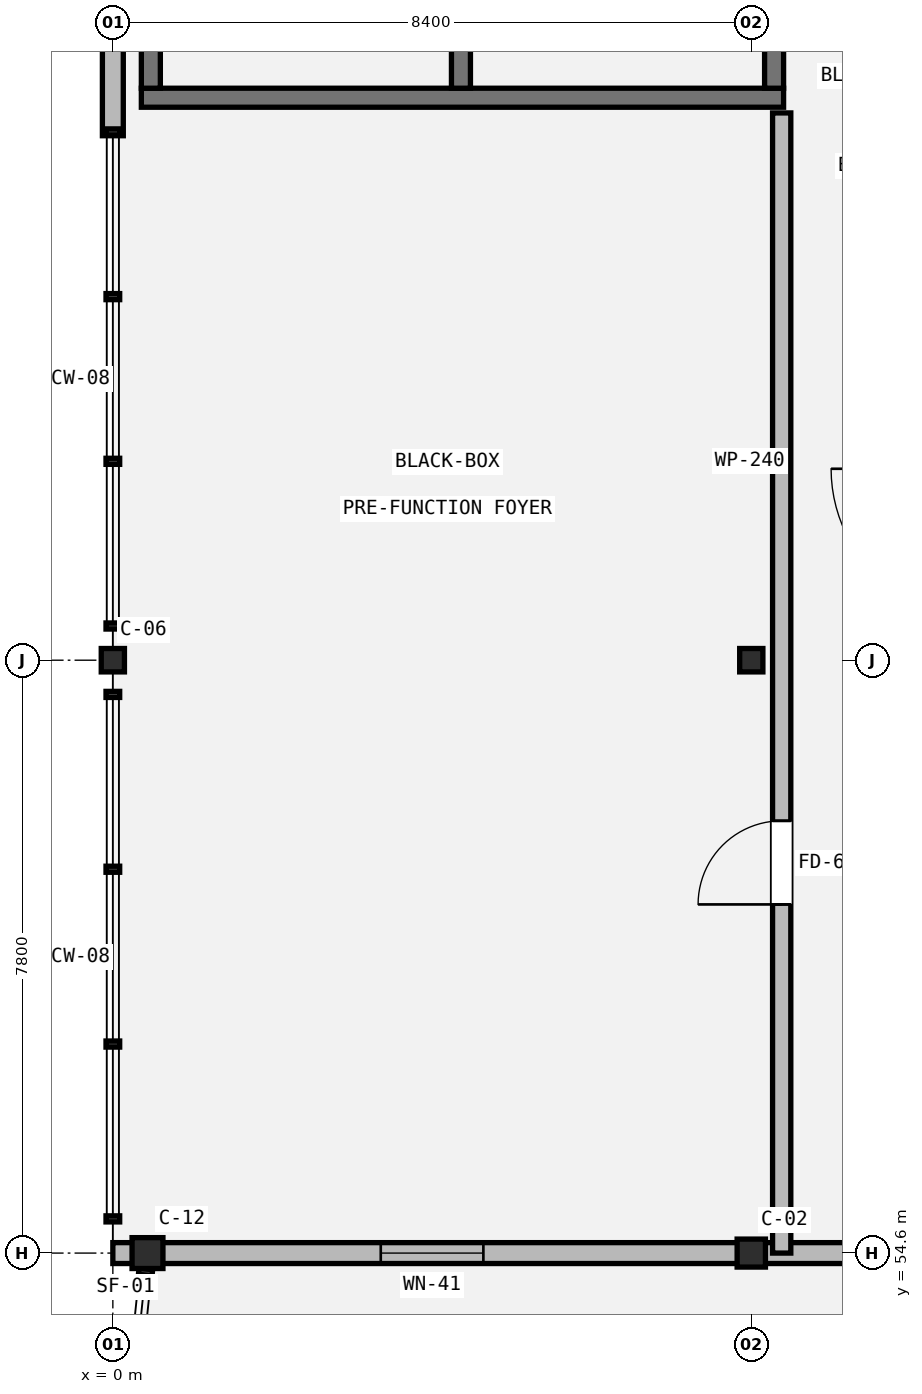
"""IFC4 building model, lengths in metres.
Left out: names, types, materials, properties, quantities, classifications, styles, units other than length and angle.
Written with IfcOpenShell. Run it as: python <this file> out.ifc"""

import sys

from ifc_helpers import new_model, si_unit, direction, frame, frame_2d, origin, origin_2d, place, context, subcontext, project, spatial, rectangle, hollow_circle, i_section, extrude, element, fill, save


model = new_model("IFC4")
c1 = context("Model", 3, precision=1e-05, world=origin(), true_north=direction((0.0, 1.0)))
c2 = subcontext(c1, "Body", "Model", "MODEL_VIEW")
j1 = project(units=[si_unit("LENGTHUNIT", "METRE"), si_unit("PLANEANGLEUNIT", "RADIAN")], contexts=[c1])
p1 = place(None, origin())
s1 = spatial("IfcSite", under=j1, at=p1, CompositionType="ELEMENT")
p2 = place(p1, origin())
s2 = spatial("IfcBuilding", under=s1, at=p2, CompositionType="ELEMENT")
p3 = place(p2, frame((0.0, 0.0, 5.4)))
s3 = spatial("IfcBuildingStorey", under=s2, at=p3, CompositionType="ELEMENT", Elevation=5.4)
p4 = place(p3, frame((8.4, 54.6, 0.0), z_axis=(0.0, 0.0, 1.0), x_axis=(1.0, 0.0, 0.0)))
e1 = element("IfcColumn", 1, at=p4, inside=s3, PredefinedType="COLUMN", context=c2, shape_type="SweptSolid", body=[
    extrude(i_section(OverallWidth=0.373, OverallDepth=0.368, WebThickness=0.014, FlangeThickness=0.024, FilletRadius=0.015, at=origin_2d()), origin(), (0.0, 0.0, 1.0), 4.8),
])
p5 = place(p3, frame((0.456, 54.6, 0.0), z_axis=(0.0, 0.0, 1.0), x_axis=(1.0, 0.0, 0.0)))
e2 = element("IfcColumn", 2, at=p5, inside=s3, PredefinedType="COLUMN", context=c2, shape_type="SweptSolid", body=[
    extrude(hollow_circle(Radius=0.203, WallThickness=0.016, at=origin_2d()), origin(), (0.0, 0.0, 1.0), 4.8),
])
for number, where, z_axis, x_axis in (
    (3, (0.0, 62.4, 0.0), (0.0, 0.0, 1.0), (1.0, 0.0, 0.0)),
    (4, (8.4, 62.4, 0.0), (0.0, 0.0, 1.0), (1.0, 0.0, 0.0)),
):
    element("IfcColumn", number, at=place(p3, frame(where, z_axis=z_axis, x_axis=x_axis)), inside=s3, PredefinedType="COLUMN", context=c2, shape_type="SweptSolid", body=[
        extrude(i_section(OverallWidth=0.305, OverallDepth=0.308, WebThickness=0.01, FlangeThickness=0.015, FilletRadius=0.015, at=origin_2d()), origin(), (0.0, 0.0, 1.0), 4.8),
    ])
p6 = place(p3, frame((25.2, 54.6, 0.0), z_axis=(0.0, 0.0, 1.0), x_axis=(-1.0, 0.0, 0.0)))
e5 = element("IfcWall", 5, at=p6, inside=s3, PredefinedType="STANDARD", context=c2, shape_type="SweptSolid", body=[
    extrude(rectangle(XDim=25.2, YDim=0.275, at=frame_2d((12.6, 0.0))), origin(), (0.0, 0.0, 1.0), 3.866),
])
p7 = place(p6, frame((2.775, 0.0, 0.9)))
e6 = element("IfcOpeningElement", 6, at=p7, cuts=e5, PredefinedType="OPENING", context=c2, shape_type="SweptSolid", body=[
    extrude(rectangle(XDim=1.05, YDim=1.35, at=frame_2d((0.525, 0.675))), frame((0.0, 0.147, 0.0), z_axis=(0.0, -1.0, 0.0), x_axis=(1.0, 0.0, 0.0)), (0.0, 0.0, 1.0), 0.295),
])
p8 = place(p6, frame((12.025, 0.0, 0.9)))
e7 = element("IfcOpeningElement", 7, at=p8, cuts=e5, PredefinedType="OPENING", context=c2, shape_type="SweptSolid", body=[
    extrude(rectangle(XDim=1.15, YDim=1.4, at=frame_2d((0.575, 0.7))), frame((0.0, 0.147, 0.0), z_axis=(0.0, -1.0, 0.0), x_axis=(1.0, 0.0, 0.0)), (0.0, 0.0, 1.0), 0.295),
])
p9 = place(p6, frame((20.325, 0.0, 0.9)))
e8 = element("IfcOpeningElement", 8, at=p9, cuts=e5, PredefinedType="OPENING", context=c2, shape_type="SweptSolid", body=[
    extrude(rectangle(XDim=1.35, YDim=2.2, at=frame_2d((0.675, 1.1))), frame((0.0, 0.147, 0.0), z_axis=(0.0, -1.0, 0.0), x_axis=(1.0, 0.0, 0.0)), (0.0, 0.0, 1.0), 0.295),
])
p10 = place(p3, frame((0.0, 69.3, 0.0), z_axis=(0.0, 0.0, 1.0), x_axis=(0.0, 1.0, 0.0)))
e9 = element("IfcWall", 9, at=p10, inside=s3, PredefinedType="STANDARD", context=c2, shape_type="SweptSolid", body=[
    extrude(rectangle(XDim=11.3, YDim=0.275, at=frame_2d((5.65, 0.0))), origin(), (0.0, 0.0, 1.0), 3.955),
])
p11 = place(p3, frame((8.825, 69.8, 0.0), z_axis=(0.0, 0.0, 1.0), x_axis=(-1.0, 0.0, 0.0)))
e10 = element("IfcWall", 10, at=p11, inside=s3, PredefinedType="SHEAR", context=c2, shape_type="SweptSolid", body=[
    extrude(rectangle(XDim=8.45, YDim=0.25, at=frame_2d((4.225, 0.0))), origin(), (0.0, 0.0, 1.0), 4.58),
])
for number, where, z_axis, x_axis in (
    (11, (0.5, 69.925, 0.0), (0.0, 0.0, 1.0), (0.0, 1.0, 0.0)),
    (12, (8.7, 79.935, 0.0), (0.0, 0.0, 1.0), (0.0, -1.0, 0.0)),
):
    element("IfcWall", number, at=place(p3, frame(where, z_axis=z_axis, x_axis=x_axis)), inside=s3, PredefinedType="SHEAR", context=c2, shape_type="SweptSolid", body=[
        extrude(rectangle(XDim=10.01, YDim=0.25, at=frame_2d((5.005, 0.0))), origin(), (0.0, 0.0, 1.0), 4.58),
    ])
p12 = place(p3, frame((4.58, 79.935, 0.0), z_axis=(0.0, 0.0, 1.0), x_axis=(0.0, -1.0, 0.0)))
e13 = element("IfcWall", 13, at=p12, inside=s3, PredefinedType="SHEAR", context=c2, shape_type="SweptSolid", body=[
    extrude(rectangle(XDim=10.01, YDim=0.25, at=frame_2d((5.005, 0.0))), origin(), (0.0, 0.0, 1.0), 4.58),
])
p13 = place(p12, frame((8.36, 0.0, 0.0)))
e14 = element("IfcOpeningElement", 14, at=p13, cuts=e13, PredefinedType="OPENING", context=c2, shape_type="SweptSolid", body=[
    extrude(rectangle(XDim=1.1, YDim=2.15, at=frame_2d((0.55, 1.075))), frame((0.0, 0.135, 0.0), z_axis=(0.0, -1.0, 0.0), x_axis=(1.0, 0.0, 0.0)), (0.0, 0.0, 1.0), 0.27),
])
p14 = place(p3, frame((8.8, 54.6, 0.0), z_axis=(0.0, 0.0, 1.0), x_axis=(0.0, 1.0, 0.0)))
e15 = element("IfcWall", 15, at=p14, inside=s3, PredefinedType="PARTITIONING", context=c2, shape_type="SweptSolid", body=[
    extrude(rectangle(XDim=15.0, YDim=0.24, at=frame_2d((7.5, 0.0))), origin(), (0.0, 0.0, 1.0), 4.039),
])
p15 = place(p14, frame((4.587, 0.0, 0.0)))
e16 = element("IfcOpeningElement", 16, at=p15, cuts=e15, PredefinedType="OPENING", context=c2, shape_type="SweptSolid", body=[
    extrude(rectangle(XDim=1.1, YDim=2.15, at=frame_2d((0.55, 1.075))), frame((0.0, 0.13, 0.0), z_axis=(0.0, -1.0, 0.0), x_axis=(1.0, 0.0, 0.0)), (0.0, 0.0, 1.0), 0.26),
])
p16 = place(p9, origin())
e17 = element("IfcWindow", 17, at=p16, inside=s3, PartitioningType="SINGLE_PANEL", PredefinedType="WINDOW", context=c2, shape_type="SweptSolid", body=[
    extrude(rectangle(XDim=1.35, YDim=2.2, at=frame_2d((0.675, 1.1))), frame((0.0, 0.03, 0.0), z_axis=(0.0, -1.0, 0.0), x_axis=(1.0, 0.0, 0.0)), (0.0, 0.0, 1.0), 0.06),
])
fill(e8, e17)
p17 = place(p15, origin())
e18 = element("IfcDoor", 18, at=p17, inside=s3, OperationType="SINGLE_SWING_LEFT", PredefinedType="DOOR", context=c2, shape_type="SweptSolid", body=[
    extrude(rectangle(XDim=1.1, YDim=2.15, at=frame_2d((0.55, 1.075))), frame((0.0, 0.025, 0.0), z_axis=(0.0, -1.0, 0.0), x_axis=(1.0, 0.0, 0.0)), (0.0, 0.0, 1.0), 0.05),
])
fill(e16, e18)
save(model, sys.argv[1])
